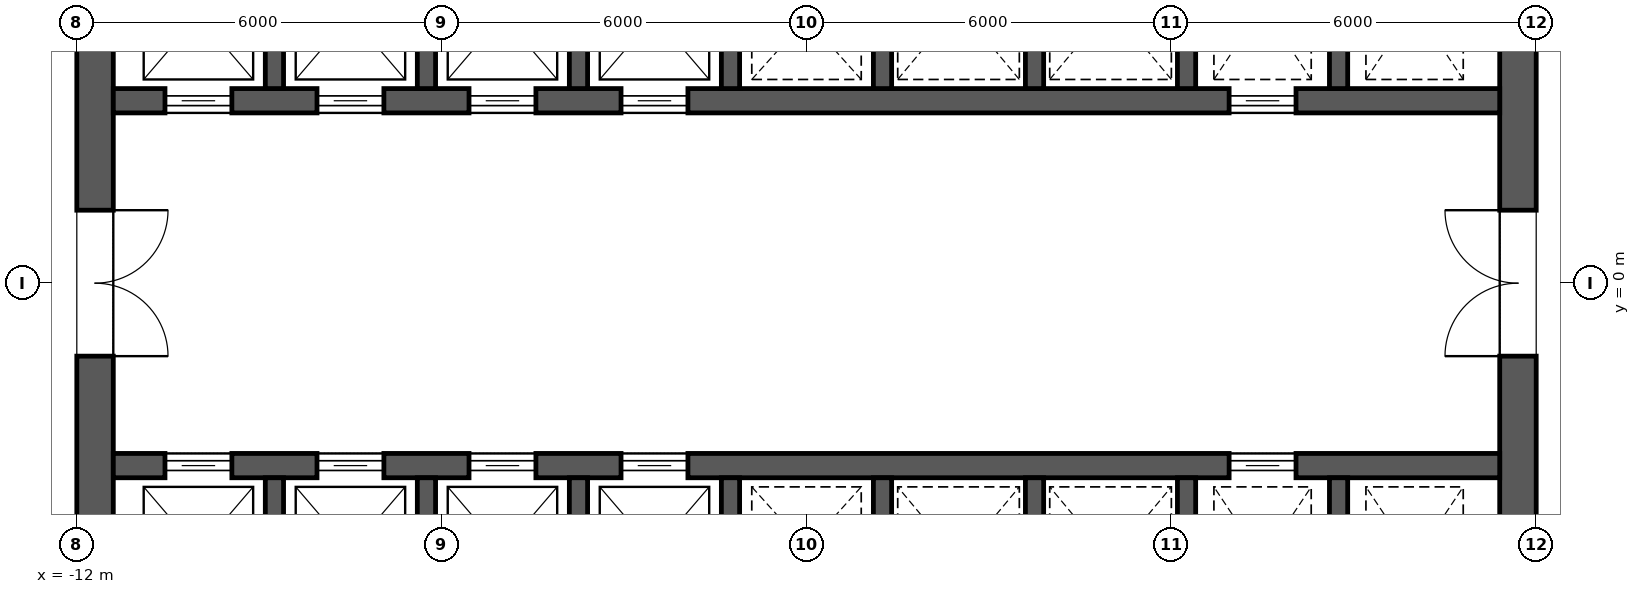
"""IFC4 building model, lengths in metres.
Left out: names, types, materials, properties, quantities, classifications, styles, units other than length and angle.
Written with IfcOpenShell. Run it as: python <this file> out.ifc"""

import sys

from ifc_helpers import new_model, si_unit, direction, frame, frame_2d, origin, place, context, subcontext, project, spatial, rectangle, extrude, element, fill, save


model = new_model("IFC4")
c1 = context("Model", 3, precision=1e-05, world=origin(), true_north=direction((0.0, 1.0)))
c2 = subcontext(c1, "Body", "Model", "MODEL_VIEW")
j1 = project(units=[si_unit("LENGTHUNIT", "METRE"), si_unit("PLANEANGLEUNIT", "RADIAN")], contexts=[c1])
p1 = place(None, origin())
s1 = spatial("IfcSite", under=j1, at=p1, CompositionType="ELEMENT")
p2 = place(p1, origin())
s2 = spatial("IfcBuilding", under=s1, at=p2, CompositionType="ELEMENT")
p3 = place(p2, frame((0.0, 0.0, 61.3)))
s3 = spatial("IfcBuildingStorey", under=s2, at=p3, CompositionType="ELEMENT", Elevation=61.3)
p4 = place(p3, frame((11.7, -11.4, 0.0), z_axis=(0.0, 0.0, 1.0), x_axis=(0.0, 1.0, 0.0)))
e1 = element("IfcWall", 1, at=p4, inside=s3, PredefinedType="SHEAR", context=c2, shape_type="SweptSolid", body=[
    extrude(rectangle(XDim=22.8, YDim=0.6, at=frame_2d((11.4, 0.0))), origin(), (0.0, 0.0, 1.0), 4.2),
])
p5 = place(p4, frame((10.2, 0.0, 0.0)))
e2 = element("IfcOpeningElement", 2, at=p5, cuts=e1, PredefinedType="OPENING", context=c2, shape_type="SweptSolid", body=[
    extrude(rectangle(XDim=2.4, YDim=2.1, at=frame_2d((1.2, 1.05))), frame((0.0, 0.312, 0.0), z_axis=(0.0, -1.0, 0.0), x_axis=(1.0, 0.0, 0.0)), (0.0, 0.0, 1.0), 0.624),
])
p6 = place(p4, frame((19.5, 0.0, 0.0)))
e3 = element("IfcOpeningElement", 3, at=p6, cuts=e1, PredefinedType="OPENING", context=c2, shape_type="SweptSolid", body=[
    extrude(rectangle(XDim=1.2, YDim=2.1, at=frame_2d((0.6, 1.05))), frame((0.0, 0.312, 0.0), z_axis=(0.0, -1.0, 0.0), x_axis=(1.0, 0.0, 0.0)), (0.0, 0.0, 1.0), 0.624),
])
p7 = place(p4, frame((2.1, 0.0, 0.0)))
e4 = element("IfcOpeningElement", 4, at=p7, cuts=e1, PredefinedType="OPENING", context=c2, shape_type="SweptSolid", body=[
    extrude(rectangle(XDim=1.2, YDim=2.1, at=frame_2d((0.6, 1.05))), frame((0.0, 0.312, 0.0), z_axis=(0.0, -1.0, 0.0), x_axis=(1.0, 0.0, 0.0)), (0.0, 0.0, 1.0), 0.624),
])
p8 = place(p3, frame((-11.7, -11.4, 0.0), z_axis=(0.0, 0.0, 1.0), x_axis=(0.0, 1.0, 0.0)))
e5 = element("IfcWall", 5, at=p8, inside=s3, PredefinedType="SHEAR", context=c2, shape_type="SweptSolid", body=[
    extrude(rectangle(XDim=22.8, YDim=0.6, at=frame_2d((11.4, 0.0))), origin(), (0.0, 0.0, 1.0), 4.2),
])
p9 = place(p8, frame((10.2, 0.0, 0.0)))
e6 = element("IfcOpeningElement", 6, at=p9, cuts=e5, PredefinedType="OPENING", context=c2, shape_type="SweptSolid", body=[
    extrude(rectangle(XDim=2.4, YDim=2.1, at=frame_2d((1.2, 1.05))), frame((0.0, 0.312, 0.0), z_axis=(0.0, -1.0, 0.0), x_axis=(1.0, 0.0, 0.0)), (0.0, 0.0, 1.0), 0.624),
])
p10 = place(p8, frame((18.925, 0.0, 0.0)))
e7 = element("IfcOpeningElement", 7, at=p10, cuts=e5, PredefinedType="OPENING", context=c2, shape_type="SweptSolid", body=[
    extrude(rectangle(XDim=1.2, YDim=2.1, at=frame_2d((0.6, 1.05))), frame((0.0, 0.312, 0.0), z_axis=(0.0, -1.0, 0.0), x_axis=(1.0, 0.0, 0.0)), (0.0, 0.0, 1.0), 0.624),
])
p11 = place(p8, frame((2.675, 0.0, 0.0)))
e8 = element("IfcOpeningElement", 8, at=p11, cuts=e5, PredefinedType="OPENING", context=c2, shape_type="SweptSolid", body=[
    extrude(rectangle(XDim=1.2, YDim=2.1, at=frame_2d((0.6, 1.05))), frame((0.0, 0.312, 0.0), z_axis=(0.0, -1.0, 0.0), x_axis=(1.0, 0.0, 0.0)), (0.0, 0.0, 1.0), 0.624),
])
p12 = place(p3, frame((-11.4, 3.0, 0.0), z_axis=(0.0, 0.0, 1.0), x_axis=(1.0, 0.0, 0.0)))
e9 = element("IfcWall", 9, at=p12, inside=s3, PredefinedType="SHEAR", context=c2, shape_type="SweptSolid", body=[
    extrude(rectangle(XDim=22.8, YDim=0.4, at=frame_2d((11.4, 0.0))), origin(), (0.0, 0.0, 1.0), 4.2),
])
p13 = place(p12, frame((0.85, 0.0, 0.0)))
e10 = element("IfcOpeningElement", 10, at=p13, cuts=e9, PredefinedType="OPENING", context=c2, shape_type="SweptSolid", body=[
    extrude(rectangle(XDim=1.1, YDim=2.1, at=frame_2d((0.55, 1.05))), frame((0.0, 0.212, 0.0), z_axis=(0.0, -1.0, 0.0), x_axis=(1.0, 0.0, 0.0)), (0.0, 0.0, 1.0), 0.424),
])
p14 = place(p12, frame((3.35, 0.0, 0.0)))
e11 = element("IfcOpeningElement", 11, at=p14, cuts=e9, PredefinedType="OPENING", context=c2, shape_type="SweptSolid", body=[
    extrude(rectangle(XDim=1.1, YDim=2.1, at=frame_2d((0.55, 1.05))), frame((0.0, 0.212, 0.0), z_axis=(0.0, -1.0, 0.0), x_axis=(1.0, 0.0, 0.0)), (0.0, 0.0, 1.0), 0.424),
])
p15 = place(p12, frame((5.85, 0.0, 0.0)))
e12 = element("IfcOpeningElement", 12, at=p15, cuts=e9, PredefinedType="OPENING", context=c2, shape_type="SweptSolid", body=[
    extrude(rectangle(XDim=1.1, YDim=2.1, at=frame_2d((0.55, 1.05))), frame((0.0, 0.212, 0.0), z_axis=(0.0, -1.0, 0.0), x_axis=(1.0, 0.0, 0.0)), (0.0, 0.0, 1.0), 0.424),
])
p16 = place(p12, frame((8.35, 0.0, 0.0)))
e13 = element("IfcOpeningElement", 13, at=p16, cuts=e9, PredefinedType="OPENING", context=c2, shape_type="SweptSolid", body=[
    extrude(rectangle(XDim=1.1, YDim=2.1, at=frame_2d((0.55, 1.05))), frame((0.0, 0.212, 0.0), z_axis=(0.0, -1.0, 0.0), x_axis=(1.0, 0.0, 0.0)), (0.0, 0.0, 1.0), 0.424),
])
p17 = place(p12, frame((18.35, 0.0, 0.0)))
e14 = element("IfcOpeningElement", 14, at=p17, cuts=e9, PredefinedType="OPENING", context=c2, shape_type="SweptSolid", body=[
    extrude(rectangle(XDim=1.1, YDim=2.1, at=frame_2d((0.55, 1.05))), frame((0.0, 0.212, 0.0), z_axis=(0.0, -1.0, 0.0), x_axis=(1.0, 0.0, 0.0)), (0.0, 0.0, 1.0), 0.424),
])
for number, where, z_axis, x_axis in (
    (15, (-8.75, 3.2, 0.0), (0.0, 0.0, 1.0), (0.0, 1.0, 0.0)),
    (16, (-6.25, 3.2, 0.0), (0.0, 0.0, 1.0), (0.0, 1.0, 0.0)),
    (17, (-3.75, 3.2, 0.0), (0.0, 0.0, 1.0), (0.0, 1.0, 0.0)),
    (18, (-1.25, 3.2, 0.0), (0.0, 0.0, 1.0), (0.0, 1.0, 0.0)),
    (19, (1.25, 3.2, 0.0), (0.0, 0.0, 1.0), (0.0, 1.0, 0.0)),
    (20, (3.75, 3.2, 0.0), (0.0, 0.0, 1.0), (0.0, 1.0, 0.0)),
    (21, (6.25, 3.2, 0.0), (0.0, 0.0, 1.0), (0.0, 1.0, 0.0)),
    (22, (8.75, 3.2, 0.0), (0.0, 0.0, 1.0), (0.0, 1.0, 0.0)),
):
    element("IfcWall", number, at=place(p3, frame(where, z_axis=z_axis, x_axis=x_axis)), inside=s3, PredefinedType="SHEAR", context=c2, shape_type="SweptSolid", body=[
        extrude(rectangle(XDim=2.9, YDim=0.3, at=frame_2d((1.45, 0.0))), origin(), (0.0, 0.0, 1.0), 4.2),
    ])
p18 = place(p3, frame((-11.4, -3.0, 0.0), z_axis=(0.0, 0.0, 1.0), x_axis=(1.0, 0.0, 0.0)))
e23 = element("IfcWall", 23, at=p18, inside=s3, PredefinedType="SHEAR", context=c2, shape_type="SweptSolid", body=[
    extrude(rectangle(XDim=22.8, YDim=0.4, at=frame_2d((11.4, 0.0))), origin(), (0.0, 0.0, 1.0), 4.2),
])
p19 = place(p18, frame((0.85, 0.0, 0.0)))
e24 = element("IfcOpeningElement", 24, at=p19, cuts=e23, PredefinedType="OPENING", context=c2, shape_type="SweptSolid", body=[
    extrude(rectangle(XDim=1.1, YDim=2.1, at=frame_2d((0.55, 1.05))), frame((0.0, 0.212, 0.0), z_axis=(0.0, -1.0, 0.0), x_axis=(1.0, 0.0, 0.0)), (0.0, 0.0, 1.0), 0.424),
])
p20 = place(p18, frame((3.35, 0.0, 0.0)))
e25 = element("IfcOpeningElement", 25, at=p20, cuts=e23, PredefinedType="OPENING", context=c2, shape_type="SweptSolid", body=[
    extrude(rectangle(XDim=1.1, YDim=2.1, at=frame_2d((0.55, 1.05))), frame((0.0, 0.212, 0.0), z_axis=(0.0, -1.0, 0.0), x_axis=(1.0, 0.0, 0.0)), (0.0, 0.0, 1.0), 0.424),
])
p21 = place(p18, frame((5.85, 0.0, 0.0)))
e26 = element("IfcOpeningElement", 26, at=p21, cuts=e23, PredefinedType="OPENING", context=c2, shape_type="SweptSolid", body=[
    extrude(rectangle(XDim=1.1, YDim=2.1, at=frame_2d((0.55, 1.05))), frame((0.0, 0.212, 0.0), z_axis=(0.0, -1.0, 0.0), x_axis=(1.0, 0.0, 0.0)), (0.0, 0.0, 1.0), 0.424),
])
p22 = place(p18, frame((8.35, 0.0, 0.0)))
e27 = element("IfcOpeningElement", 27, at=p22, cuts=e23, PredefinedType="OPENING", context=c2, shape_type="SweptSolid", body=[
    extrude(rectangle(XDim=1.1, YDim=2.1, at=frame_2d((0.55, 1.05))), frame((0.0, 0.212, 0.0), z_axis=(0.0, -1.0, 0.0), x_axis=(1.0, 0.0, 0.0)), (0.0, 0.0, 1.0), 0.424),
])
p23 = place(p18, frame((18.35, 0.0, 0.0)))
e28 = element("IfcOpeningElement", 28, at=p23, cuts=e23, PredefinedType="OPENING", context=c2, shape_type="SweptSolid", body=[
    extrude(rectangle(XDim=1.1, YDim=2.1, at=frame_2d((0.55, 1.05))), frame((0.0, 0.212, 0.0), z_axis=(0.0, -1.0, 0.0), x_axis=(1.0, 0.0, 0.0)), (0.0, 0.0, 1.0), 0.424),
])
for number, where, z_axis, x_axis in (
    (29, (-8.75, -6.1, 0.0), (0.0, 0.0, 1.0), (0.0, 1.0, 0.0)),
    (30, (-6.25, -6.1, 0.0), (0.0, 0.0, 1.0), (0.0, 1.0, 0.0)),
    (31, (-3.75, -6.1, 0.0), (0.0, 0.0, 1.0), (0.0, 1.0, 0.0)),
    (32, (-1.25, -6.1, 0.0), (0.0, 0.0, 1.0), (0.0, 1.0, 0.0)),
    (33, (1.25, -6.1, 0.0), (0.0, 0.0, 1.0), (0.0, 1.0, 0.0)),
    (34, (3.75, -6.1, 0.0), (0.0, 0.0, 1.0), (0.0, 1.0, 0.0)),
    (35, (6.25, -6.1, 0.0), (0.0, 0.0, 1.0), (0.0, 1.0, 0.0)),
    (36, (8.75, -6.1, 0.0), (0.0, 0.0, 1.0), (0.0, 1.0, 0.0)),
):
    element("IfcWall", number, at=place(p3, frame(where, z_axis=z_axis, x_axis=x_axis)), inside=s3, PredefinedType="SHEAR", context=c2, shape_type="SweptSolid", body=[
        extrude(rectangle(XDim=2.9, YDim=0.3, at=frame_2d((1.45, 0.0))), origin(), (0.0, 0.0, 1.0), 4.2),
    ])
p24 = place(p13, origin())
e37 = element("IfcDoor", 37, at=p24, inside=s3, OperationType="SLIDING_TO_LEFT", PredefinedType="DOOR", context=c2, shape_type="SweptSolid", body=[
    extrude(rectangle(XDim=1.1, YDim=2.1, at=frame_2d((0.55, 1.05))), frame((0.0, 0.025, 0.0), z_axis=(0.0, -1.0, 0.0), x_axis=(1.0, 0.0, 0.0)), (0.0, 0.0, 1.0), 0.05),
])
fill(e10, e37)
p25 = place(p14, origin())
e38 = element("IfcDoor", 38, at=p25, inside=s3, OperationType="SLIDING_TO_LEFT", PredefinedType="DOOR", context=c2, shape_type="SweptSolid", body=[
    extrude(rectangle(XDim=1.1, YDim=2.1, at=frame_2d((0.55, 1.05))), frame((0.0, 0.025, 0.0), z_axis=(0.0, -1.0, 0.0), x_axis=(1.0, 0.0, 0.0)), (0.0, 0.0, 1.0), 0.05),
])
fill(e11, e38)
p26 = place(p15, origin())
e39 = element("IfcDoor", 39, at=p26, inside=s3, OperationType="SLIDING_TO_LEFT", PredefinedType="DOOR", context=c2, shape_type="SweptSolid", body=[
    extrude(rectangle(XDim=1.1, YDim=2.1, at=frame_2d((0.55, 1.05))), frame((0.0, 0.025, 0.0), z_axis=(0.0, -1.0, 0.0), x_axis=(1.0, 0.0, 0.0)), (0.0, 0.0, 1.0), 0.05),
])
fill(e12, e39)
p27 = place(p16, origin())
e40 = element("IfcDoor", 40, at=p27, inside=s3, OperationType="SLIDING_TO_LEFT", PredefinedType="DOOR", context=c2, shape_type="SweptSolid", body=[
    extrude(rectangle(XDim=1.1, YDim=2.1, at=frame_2d((0.55, 1.05))), frame((0.0, 0.025, 0.0), z_axis=(0.0, -1.0, 0.0), x_axis=(1.0, 0.0, 0.0)), (0.0, 0.0, 1.0), 0.05),
])
fill(e13, e40)
p28 = place(p19, origin())
e41 = element("IfcDoor", 41, at=p28, inside=s3, OperationType="SLIDING_TO_LEFT", PredefinedType="DOOR", context=c2, shape_type="SweptSolid", body=[
    extrude(rectangle(XDim=1.1, YDim=2.1, at=frame_2d((0.55, 1.05))), frame((0.0, 0.025, 0.0), z_axis=(0.0, -1.0, 0.0), x_axis=(1.0, 0.0, 0.0)), (0.0, 0.0, 1.0), 0.05),
])
fill(e24, e41)
p29 = place(p20, origin())
e42 = element("IfcDoor", 42, at=p29, inside=s3, OperationType="SLIDING_TO_LEFT", PredefinedType="DOOR", context=c2, shape_type="SweptSolid", body=[
    extrude(rectangle(XDim=1.1, YDim=2.1, at=frame_2d((0.55, 1.05))), frame((0.0, 0.025, 0.0), z_axis=(0.0, -1.0, 0.0), x_axis=(1.0, 0.0, 0.0)), (0.0, 0.0, 1.0), 0.05),
])
fill(e25, e42)
p30 = place(p21, origin())
e43 = element("IfcDoor", 43, at=p30, inside=s3, OperationType="SLIDING_TO_LEFT", PredefinedType="DOOR", context=c2, shape_type="SweptSolid", body=[
    extrude(rectangle(XDim=1.1, YDim=2.1, at=frame_2d((0.55, 1.05))), frame((0.0, 0.025, 0.0), z_axis=(0.0, -1.0, 0.0), x_axis=(1.0, 0.0, 0.0)), (0.0, 0.0, 1.0), 0.05),
])
fill(e26, e43)
p31 = place(p22, origin())
e44 = element("IfcDoor", 44, at=p31, inside=s3, OperationType="SLIDING_TO_LEFT", PredefinedType="DOOR", context=c2, shape_type="SweptSolid", body=[
    extrude(rectangle(XDim=1.1, YDim=2.1, at=frame_2d((0.55, 1.05))), frame((0.0, 0.025, 0.0), z_axis=(0.0, -1.0, 0.0), x_axis=(1.0, 0.0, 0.0)), (0.0, 0.0, 1.0), 0.05),
])
fill(e27, e44)
p32 = place(p17, origin())
e45 = element("IfcDoor", 45, at=p32, inside=s3, OperationType="SLIDING_TO_LEFT", PredefinedType="DOOR", context=c2, shape_type="SweptSolid", body=[
    extrude(rectangle(XDim=1.1, YDim=2.1, at=frame_2d((0.55, 1.05))), frame((0.0, 0.025, 0.0), z_axis=(0.0, -1.0, 0.0), x_axis=(1.0, 0.0, 0.0)), (0.0, 0.0, 1.0), 0.05),
])
fill(e14, e45)
p33 = place(p23, origin())
e46 = element("IfcDoor", 46, at=p33, inside=s3, OperationType="SLIDING_TO_LEFT", PredefinedType="DOOR", context=c2, shape_type="SweptSolid", body=[
    extrude(rectangle(XDim=1.1, YDim=2.1, at=frame_2d((0.55, 1.05))), frame((0.0, 0.025, 0.0), z_axis=(0.0, -1.0, 0.0), x_axis=(1.0, 0.0, 0.0)), (0.0, 0.0, 1.0), 0.05),
])
fill(e28, e46)
p34 = place(p9, frame((2.4, 0.0, 0.0), z_axis=(0.0, 0.0, 1.0), x_axis=(-1.0, 0.0, 0.0)))
e47 = element("IfcDoor", 47, at=p34, inside=s3, OperationType="DOUBLE_DOOR_SINGLE_SWING", PredefinedType="DOOR", context=c2, shape_type="SweptSolid", body=[
    extrude(rectangle(XDim=2.4, YDim=2.1, at=frame_2d((1.2, 1.05))), frame((0.0, 0.025, 0.0), z_axis=(0.0, -1.0, 0.0), x_axis=(1.0, 0.0, 0.0)), (0.0, 0.0, 1.0), 0.05),
])
fill(e6, e47)
p35 = place(p5, origin())
e48 = element("IfcDoor", 48, at=p35, inside=s3, OperationType="DOUBLE_DOOR_SINGLE_SWING", PredefinedType="DOOR", context=c2, shape_type="SweptSolid", body=[
    extrude(rectangle(XDim=2.4, YDim=2.1, at=frame_2d((1.2, 1.05))), frame((0.0, 0.025, 0.0), z_axis=(0.0, -1.0, 0.0), x_axis=(1.0, 0.0, 0.0)), (0.0, 0.0, 1.0), 0.05),
])
fill(e2, e48)
save(model, sys.argv[1])
